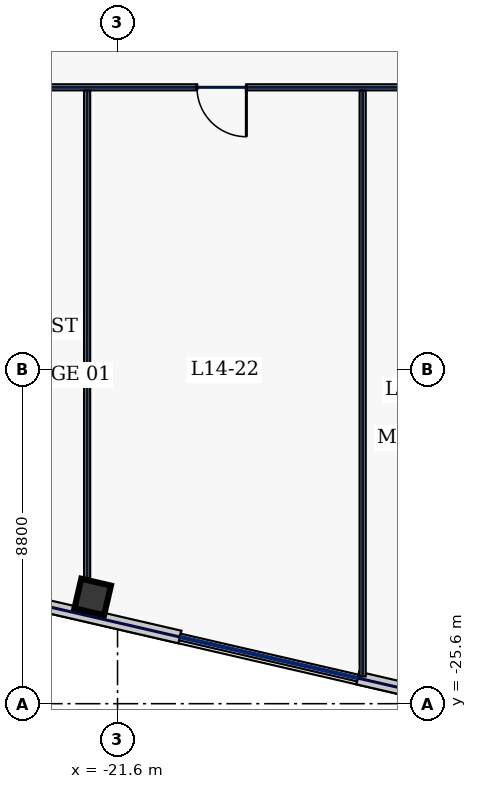
"""IFC4 building model, lengths in metres.
Left out: names, types, materials, properties, quantities, classifications, styles, units other than length and angle.
Written with IfcOpenShell. Run it as: python <this file> out.ifc"""

import sys

from ifc_helpers import new_model, si_unit, direction, frame, frame_2d, origin, origin_2d, place, context, subcontext, project, spatial, rectangle, hollow_rectangle, extrude, element, fill, save


model = new_model("IFC4")
c1 = context("Model", 3, precision=1e-05, world=origin(), true_north=direction((0.0, 1.0)))
c2 = subcontext(c1, "Body", "Model", "MODEL_VIEW")
j1 = project(units=[si_unit("LENGTHUNIT", "METRE"), si_unit("PLANEANGLEUNIT", "RADIAN")], contexts=[c1])
p1 = place(None, origin())
s1 = spatial("IfcSite", under=j1, at=p1, CompositionType="ELEMENT")
p2 = place(p1, origin())
s2 = spatial("IfcBuilding", under=s1, at=p2, CompositionType="ELEMENT")
p3 = place(p2, frame((0.0, 0.0, 67.4)))
s3 = spatial("IfcBuildingStorey", under=s2, at=p3, CompositionType="ELEMENT", Elevation=67.4)
p4 = place(p3, frame((-22.254, -22.792, 0.0), z_axis=(0.0, 0.0, 1.0), x_axis=(0.974370064785, -0.224951054344, 0.0)))
e1 = element("IfcColumn", 1, at=p4, inside=s3, PredefinedType="COLUMN", context=c2, shape_type="SweptSolid", body=[
    extrude(hollow_rectangle(XDim=0.8, YDim=0.8, WallThickness=0.036, at=origin_2d()), origin(), (0.0, 0.0, 1.0), 3.74),
])
p5 = place(p3, frame((-42.029, -18.75, 0.0), z_axis=(0.0, 0.0, 1.0), x_axis=(0.97436993772, -0.224951604723, 0.0)))
e2 = element("IfcWall", 2, at=p5, inside=s3, PredefinedType="STANDARD", context=c2, shape_type="SweptSolid", body=[
    extrude(rectangle(XDim=22.651, YDim=0.34, at=frame_2d((11.326, 0.0))), origin(), (0.0, 0.0, 1.0), 3.74),
])
p6 = place(p5, frame((2.062, 0.0, 0.72)))
e3 = element("IfcOpeningElement", 3, at=p6, cuts=e2, PredefinedType="OPENING", context=c2, shape_type="SweptSolid", body=[
    extrude(rectangle(XDim=2.5, YDim=2.15, at=frame_2d((1.25, 1.075))), frame((0.0, 0.18, 0.0), z_axis=(0.0, -1.0, 0.0), x_axis=(1.0, 0.0, 0.0)), (0.0, 0.0, 1.0), 0.36),
])
p7 = place(p5, frame((6.546, 0.0, 0.72)))
e4 = element("IfcOpeningElement", 4, at=p7, cuts=e2, PredefinedType="OPENING", context=c2, shape_type="SweptSolid", body=[
    extrude(rectangle(XDim=2.5, YDim=2.15, at=frame_2d((1.25, 1.075))), frame((0.0, 0.18, 0.0), z_axis=(0.0, -1.0, 0.0), x_axis=(1.0, 0.0, 0.0)), (0.0, 0.0, 1.0), 0.36),
])
p8 = place(p5, frame((13.461, 0.0, 0.72)))
e5 = element("IfcOpeningElement", 5, at=p8, cuts=e2, PredefinedType="OPENING", context=c2, shape_type="SweptSolid", body=[
    extrude(rectangle(XDim=0.85, YDim=1.85, at=frame_2d((0.425, 0.925))), frame((0.0, 0.18, 0.0), z_axis=(0.0, -1.0, 0.0), x_axis=(1.0, 0.0, 0.0)), (0.0, 0.0, 1.0), 0.36),
])
p9 = place(p5, frame((16.295, 0.0, 0.72)))
e6 = element("IfcOpeningElement", 6, at=p9, cuts=e2, PredefinedType="OPENING", context=c2, shape_type="SweptSolid", body=[
    extrude(rectangle(XDim=2.5, YDim=2.15, at=frame_2d((1.25, 1.075))), frame((0.0, 0.18, 0.0), z_axis=(0.0, -1.0, 0.0), x_axis=(1.0, 0.0, 0.0)), (0.0, 0.0, 1.0), 0.36),
])
p10 = place(p3, frame((-15.281, -24.925, 0.0), z_axis=(0.0, 0.0, 1.0), x_axis=(0.974370193991, -0.22495049469, 0.0)))
e7 = element("IfcWall", 7, at=p10, inside=s3, PredefinedType="STANDARD", context=c2, shape_type="SweptSolid", body=[
    extrude(rectangle(XDim=14.697, YDim=0.34, at=frame_2d((7.349, 0.0))), origin(), (0.0, 0.0, 1.0), 3.74),
])
p11 = place(p10, frame((4.306, 0.0, 0.22)))
e8 = element("IfcOpeningElement", 8, at=p11, cuts=e7, PredefinedType="OPENING", context=c2, shape_type="SweptSolid", body=[
    extrude(rectangle(XDim=1.6, YDim=1.2, at=frame_2d((0.8, 0.6))), frame((0.0, 0.18, 0.0), z_axis=(0.0, -1.0, 0.0), x_axis=(1.0, 0.0, 0.0)), (0.0, 0.0, 1.0), 0.36),
])
p12 = place(p10, frame((8.341, 0.0, 0.72)))
e9 = element("IfcOpeningElement", 9, at=p12, cuts=e7, PredefinedType="OPENING", context=c2, shape_type="SweptSolid", body=[
    extrude(rectangle(XDim=2.5, YDim=2.15, at=frame_2d((1.25, 1.075))), frame((0.0, 0.18, 0.0), z_axis=(0.0, -1.0, 0.0), x_axis=(1.0, 0.0, 0.0)), (0.0, 0.0, 1.0), 0.36),
])
p13 = place(p3, frame((29.415, -9.38, 0.0), z_axis=(0.0, 0.0, 1.0), x_axis=(-1.0, 0.0, 0.0)))
e10 = element("IfcWall", 10, at=p13, inside=s3, PredefinedType="PARTITIONING", context=c2, shape_type="SweptSolid", body=[
    extrude(rectangle(XDim=58.83, YDim=0.16, at=frame_2d((29.415, 0.0))), origin(), (0.0, 0.0, 1.0), 3.74),
])
p14 = place(p13, frame((54.781, 0.0, 0.0)))
e11 = element("IfcOpeningElement", 11, at=p14, cuts=e10, PredefinedType="OPENING", context=c2, shape_type="SweptSolid", body=[
    extrude(rectangle(XDim=0.95, YDim=2.2, at=frame_2d((0.475, 1.1))), frame((0.0, 0.09, 0.0), z_axis=(0.0, -1.0, 0.0), x_axis=(1.0, 0.0, 0.0)), (0.0, 0.0, 1.0), 0.18),
])
p15 = place(p13, frame((47.625, 0.0, 0.0)))
e12 = element("IfcOpeningElement", 12, at=p15, cuts=e10, PredefinedType="OPENING", context=c2, shape_type="SweptSolid", body=[
    extrude(rectangle(XDim=1.3, YDim=2.2, at=frame_2d((0.65, 1.1))), frame((0.0, 0.09, 0.0), z_axis=(0.0, -1.0, 0.0), x_axis=(1.0, 0.0, 0.0)), (0.0, 0.0, 1.0), 0.18),
])
p16 = place(p13, frame((40.825, 0.0, 0.0)))
e13 = element("IfcOpeningElement", 13, at=p16, cuts=e10, PredefinedType="OPENING", context=c2, shape_type="SweptSolid", body=[
    extrude(rectangle(XDim=1.45, YDim=2.2, at=frame_2d((0.725, 1.1))), frame((0.0, 0.09, 0.0), z_axis=(0.0, -1.0, 0.0), x_axis=(1.0, 0.0, 0.0)), (0.0, 0.0, 1.0), 0.18),
])
p17 = place(p13, frame((33.625, 0.0, 0.0)))
e14 = element("IfcOpeningElement", 14, at=p17, cuts=e10, PredefinedType="OPENING", context=c2, shape_type="SweptSolid", body=[
    extrude(rectangle(XDim=1.3, YDim=2.2, at=frame_2d((0.65, 1.1))), frame((0.0, 0.09, 0.0), z_axis=(0.0, -1.0, 0.0), x_axis=(1.0, 0.0, 0.0)), (0.0, 0.0, 1.0), 0.18),
])
p18 = place(p13, frame((26.2, 0.0, 0.0)))
e15 = element("IfcOpeningElement", 15, at=p18, cuts=e10, PredefinedType="OPENING", context=c2, shape_type="SweptSolid", body=[
    extrude(rectangle(XDim=0.95, YDim=2.2, at=frame_2d((0.475, 1.1))), frame((0.0, 0.09, 0.0), z_axis=(0.0, -1.0, 0.0), x_axis=(1.0, 0.0, 0.0)), (0.0, 0.0, 1.0), 0.18),
])
p19 = place(p13, frame((18.85, 0.0, 0.0)))
e16 = element("IfcOpeningElement", 16, at=p19, cuts=e10, PredefinedType="OPENING", context=c2, shape_type="SweptSolid", body=[
    extrude(rectangle(XDim=0.95, YDim=2.2, at=frame_2d((0.475, 1.1))), frame((0.0, 0.09, 0.0), z_axis=(0.0, -1.0, 0.0), x_axis=(1.0, 0.0, 0.0)), (0.0, 0.0, 1.0), 0.18),
])
p20 = place(p13, frame((11.75, 0.0, 0.0)))
e17 = element("IfcOpeningElement", 17, at=p20, cuts=e10, PredefinedType="OPENING", context=c2, shape_type="SweptSolid", body=[
    extrude(rectangle(XDim=1.05, YDim=2.2, at=frame_2d((0.525, 1.1))), frame((0.0, 0.09, 0.0), z_axis=(0.0, -1.0, 0.0), x_axis=(1.0, 0.0, 0.0)), (0.0, 0.0, 1.0), 0.18),
])
p21 = place(p13, frame((5.975, 0.0, 0.0)))
e18 = element("IfcOpeningElement", 18, at=p21, cuts=e10, PredefinedType="OPENING", context=c2, shape_type="SweptSolid", body=[
    extrude(rectangle(XDim=0.95, YDim=2.2, at=frame_2d((0.475, 1.1))), frame((0.0, 0.09, 0.0), z_axis=(0.0, -1.0, 0.0), x_axis=(1.0, 0.0, 0.0)), (0.0, 0.0, 1.0), 0.18),
])
p22 = place(p13, frame((1.719, 0.0, 0.0)))
e19 = element("IfcOpeningElement", 19, at=p22, cuts=e10, PredefinedType="OPENING", context=c2, shape_type="SweptSolid", body=[
    extrude(rectangle(XDim=1.15, YDim=2.2, at=frame_2d((0.575, 1.1))), frame((0.0, 0.09, 0.0), z_axis=(0.0, -1.0, 0.0), x_axis=(1.0, 0.0, 0.0)), (0.0, 0.0, 1.0), 0.18),
])
p23 = place(p3, frame((-22.4, -23.21, 0.0), z_axis=(0.0, 0.0, 1.0), x_axis=(0.0, 1.0, 0.0)))
e20 = element("IfcWall", 20, at=p23, inside=s3, PredefinedType="PARTITIONING", context=c2, shape_type="SweptSolid", body=[
    extrude(rectangle(XDim=13.745, YDim=0.16, at=frame_2d((6.872, 0.0))), origin(), (0.0, 0.0, 1.0), 3.235),
])
p24 = place(p3, frame((-15.15, -24.884, 0.0), z_axis=(0.0, 0.0, 1.0), x_axis=(0.0, 1.0, 0.0)))
e21 = element("IfcWall", 21, at=p24, inside=s3, PredefinedType="PARTITIONING", context=c2, shape_type="SweptSolid", body=[
    extrude(rectangle(XDim=15.418, YDim=0.16, at=frame_2d((7.709, 0.0))), origin(), (0.0, 0.0, 1.0), 3.74),
])
p25 = place(p15, origin())
e22 = element("IfcDoor", 22, at=p25, inside=s3, OperationType="SINGLE_SWING_LEFT", PredefinedType="DOOR", context=c2, shape_type="SweptSolid", body=[
    extrude(rectangle(XDim=1.3, YDim=2.2, at=frame_2d((0.65, 1.1))), frame((0.0, 0.025, 0.0), z_axis=(0.0, -1.0, 0.0), x_axis=(1.0, 0.0, 0.0)), (0.0, 0.0, 1.0), 0.05),
])
fill(e12, e22)
save(model, sys.argv[1])
